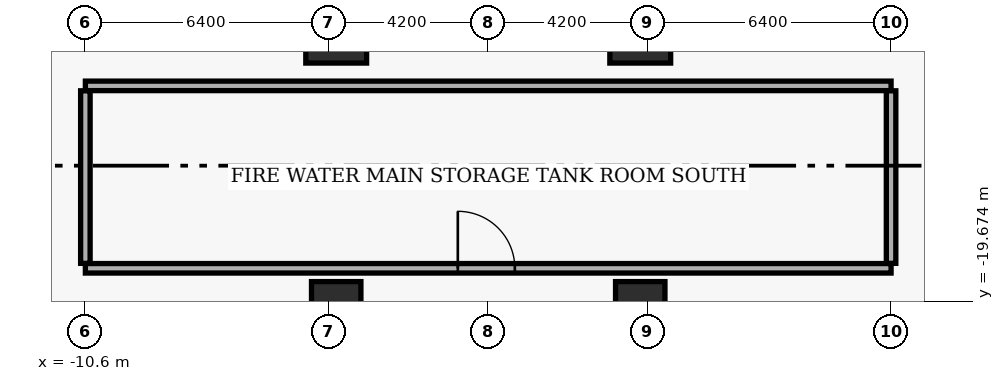
"""IFC4 building model, lengths in metres.
Left out: names, types, materials, properties, quantities, classifications, styles, units other than length and angle.
Written with IfcOpenShell. Run it as: python <this file> out.ifc"""

import sys

from ifc_helpers import new_model, si_unit, direction, frame, frame_2d, origin, origin_2d, place, context, subcontext, project, spatial, rectangle, extrude, element, fill, save


model = new_model("IFC4")
c1 = context("Model", 3, precision=1e-05, world=origin(), true_north=direction((0.0, 1.0)))
c2 = subcontext(c1, "Body", "Model", "MODEL_VIEW")
j1 = project(units=[si_unit("LENGTHUNIT", "METRE"), si_unit("PLANEANGLEUNIT", "RADIAN")], contexts=[c1])
p1 = place(None, origin())
s1 = spatial("IfcSite", under=j1, at=p1, CompositionType="ELEMENT")
p2 = place(p1, origin())
s2 = spatial("IfcBuilding", under=s1, at=p2, CompositionType="ELEMENT")
p3 = place(p2, frame((0.0, 0.0, -10.4)))
s3 = spatial("IfcBuildingStorey", under=s2, at=p3, CompositionType="ELEMENT", Elevation=-10.4)
for number, where, z_axis, x_axis in (
    (1, (-4.0, -12.6, 0.0), (0.0, 0.0, 1.0), (1.0, 0.0, 0.0)),
    (2, (4.0, -12.6, 0.0), (0.0, 0.0, 1.0), (1.0, 0.0, 0.0)),
):
    element("IfcColumn", number, at=place(p3, frame(where, z_axis=z_axis, x_axis=x_axis)), inside=s3, PredefinedType="COLUMN", context=c2, shape_type="SweptSolid", body=[
        extrude(rectangle(XDim=1.6, YDim=1.6, at=origin_2d()), origin(), (0.0, 0.0, 1.0), 5.2),
    ])
for number, where, z_axis, x_axis in (
    (3, (-4.0, -19.8, 0.0), (0.0, 0.0, 1.0), (1.0, 0.0, 0.0)),
    (4, (4.0, -19.8, 0.0), (0.0, 0.0, 1.0), (1.0, 0.0, 0.0)),
):
    element("IfcColumn", number, at=place(p3, frame(where, z_axis=z_axis, x_axis=x_axis)), inside=s3, PredefinedType="COLUMN", context=c2, shape_type="SweptSolid", body=[
        extrude(rectangle(XDim=1.3, YDim=1.3, at=origin_2d()), origin(), (0.0, 0.0, 1.0), 5.2),
    ])
p4 = place(p3, frame((-10.6, -18.8, 0.0), z_axis=(0.0, 0.0, 1.0), x_axis=(1.0, 0.0, 0.0)))
e5 = element("IfcWall", 5, at=p4, inside=s3, PredefinedType="SOLIDWALL", context=c2, shape_type="SweptSolid", body=[
    extrude(rectangle(XDim=21.2, YDim=0.25, at=frame_2d((10.6, 0.0))), origin(), (0.0, 0.0, 1.0), 3.87),
])
p5 = place(p4, frame((9.8, 0.0, 0.0)))
e6 = element("IfcOpeningElement", 6, at=p5, cuts=e5, PredefinedType="OPENING", context=c2, shape_type="SweptSolid", body=[
    extrude(rectangle(XDim=1.5, YDim=2.15, at=frame_2d((0.75, 1.075))), frame((0.0, 0.135, 0.0), z_axis=(0.0, -1.0, 0.0), x_axis=(1.0, 0.0, 0.0)), (0.0, 0.0, 1.0), 0.27),
])
p6 = place(p3, frame((-10.6, -14.0, 0.0), z_axis=(0.0, 0.0, 1.0), x_axis=(1.0, 0.0, 0.0)))
e7 = element("IfcWall", 7, at=p6, inside=s3, PredefinedType="SOLIDWALL", context=c2, shape_type="SweptSolid", body=[
    extrude(rectangle(XDim=21.2, YDim=0.25, at=frame_2d((10.6, 0.0))), origin(), (0.0, 0.0, 1.0), 3.87),
])
for number, where, z_axis, x_axis in (
    (8, (-10.6, -18.67, 0.0), (0.0, 0.0, 1.0), (0.0, 1.0, 0.0)),
    (9, (10.6, -18.67, 0.0), (0.0, 0.0, 1.0), (0.0, 1.0, 0.0)),
):
    element("IfcWall", number, at=place(p3, frame(where, z_axis=z_axis, x_axis=x_axis)), inside=s3, PredefinedType="SOLIDWALL", context=c2, shape_type="SweptSolid", body=[
        extrude(rectangle(XDim=4.54, YDim=0.25, at=frame_2d((2.27, 0.0))), origin(), (0.0, 0.0, 1.0), 3.87),
    ])
p7 = place(p5, origin())
e10 = element("IfcDoor", 10, at=p7, inside=s3, OperationType="DOUBLE_DOOR_SINGLE_SWING", PredefinedType="DOOR", context=c2, shape_type="SweptSolid", body=[
    extrude(rectangle(XDim=1.5, YDim=2.15, at=frame_2d((0.75, 1.075))), frame((0.0, 0.025, 0.0), z_axis=(0.0, -1.0, 0.0), x_axis=(1.0, 0.0, 0.0)), (0.0, 0.0, 1.0), 0.05),
])
fill(e6, e10)
save(model, sys.argv[1])
